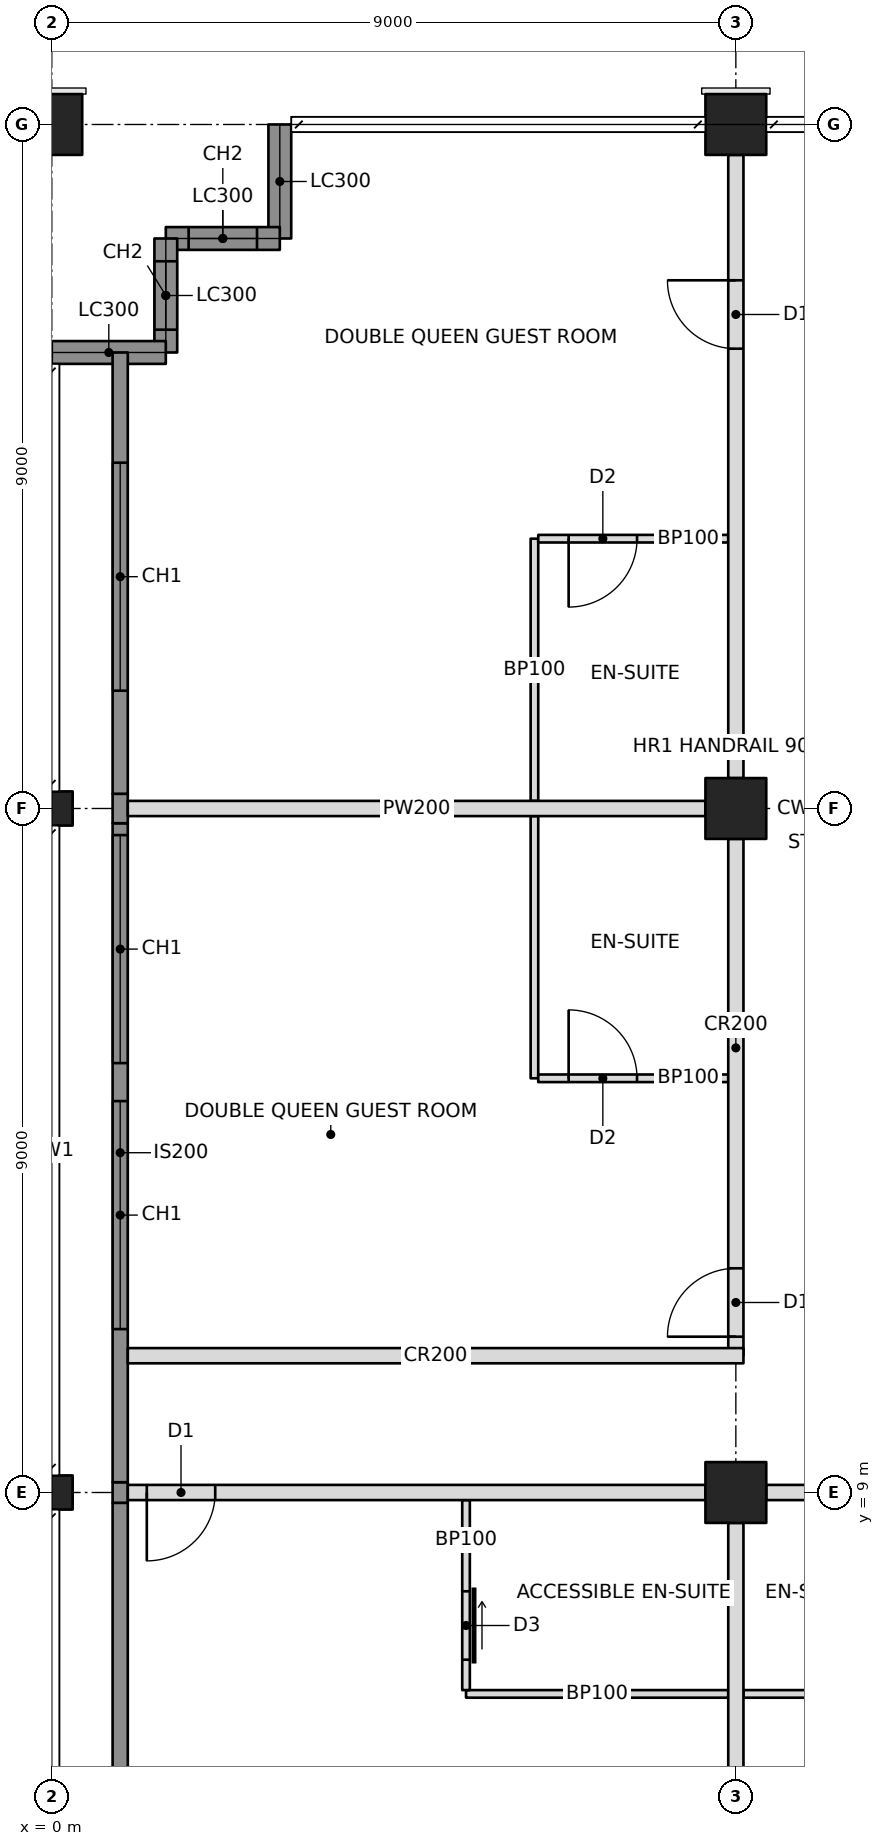
"""IFC4 building model, lengths in metres.
Left out: names, types, materials, properties, quantities, classifications, styles, units other than length and angle.
Written with IfcOpenShell. Run it as: python <this file> out.ifc"""

import sys

from ifc_helpers import new_model, si_unit, direction, frame, frame_2d, origin, origin_2d, place, context, subcontext, project, spatial, rectangle, hollow_rectangle, i_section, extrude, element, fill, save


model = new_model("IFC4")
c1 = context("Model", 3, precision=1e-05, world=origin(), true_north=direction((0.0, 1.0)))
c2 = subcontext(c1, "Body", "Model", "MODEL_VIEW")
j1 = project(units=[si_unit("LENGTHUNIT", "METRE"), si_unit("PLANEANGLEUNIT", "RADIAN")], contexts=[c1])
p1 = place(None, origin())
s1 = spatial("IfcSite", under=j1, at=p1, CompositionType="ELEMENT")
p2 = place(p1, origin())
s2 = spatial("IfcBuilding", under=s1, at=p2, CompositionType="ELEMENT")
p3 = place(p2, frame((0.0, 0.0, 191.0)))
s3 = spatial("IfcBuildingStorey", under=s2, at=p3, CompositionType="ELEMENT", Elevation=191.0)
for number, where, z_axis, x_axis in (
    (1, (0.0, 9.0, 0.0), (0.0, 0.0, 1.0), (0.0, 1.0, 0.0)),
    (2, (0.0, 18.0, 0.0), (0.0, 0.0, 1.0), (0.0, 1.0, 0.0)),
):
    element("IfcColumn", number, at=place(p3, frame(where, z_axis=z_axis, x_axis=x_axis)), inside=s3, PredefinedType="COLUMN", context=c2, shape_type="SweptSolid", body=[
        extrude(i_section(OverallWidth=0.449, OverallDepth=0.549, WebThickness=0.072, FlangeThickness=0.115, at=origin_2d()), origin(), (0.0, 0.0, 1.0), 3.4),
    ])
p4 = place(p3, frame((0.0, 27.0, 0.0), z_axis=(0.0, 0.0, 1.0), x_axis=(0.0, 1.0, 0.0)))
e3 = element("IfcColumn", 3, at=p4, inside=s3, PredefinedType="COLUMN", context=c2, shape_type="SweptSolid", body=[
    extrude(hollow_rectangle(XDim=0.8, YDim=0.8, WallThickness=0.07, at=origin_2d()), origin(), (0.0, 0.0, 1.0), 3.4),
])
for number, where, z_axis, x_axis in (
    (4, (9.0, 9.0, 0.0), (0.0, 0.0, 1.0), (1.0, 0.0, 0.0)),
    (5, (9.0, 18.0, 0.0), (0.0, 0.0, 1.0), (1.0, 0.0, 0.0)),
):
    element("IfcColumn", number, at=place(p3, frame(where, z_axis=z_axis, x_axis=x_axis)), inside=s3, PredefinedType="COLUMN", context=c2, shape_type="SweptSolid", body=[
        extrude(hollow_rectangle(XDim=0.8, YDim=0.8, WallThickness=0.06, at=origin_2d()), origin(), (0.0, 0.0, 1.0), 3.4),
    ])
p5 = place(p3, frame((9.0, 27.0, 0.0), z_axis=(0.0, 0.0, 1.0), x_axis=(1.0, 0.0, 0.0)))
e6 = element("IfcColumn", 6, at=p5, inside=s3, PredefinedType="COLUMN", context=c2, shape_type="SweptSolid", body=[
    extrude(hollow_rectangle(XDim=0.8, YDim=0.8, WallThickness=0.07, at=origin_2d()), origin(), (0.0, 0.0, 1.0), 3.4),
])
p6 = place(p3, frame((3.0, 27.0, 0.0), z_axis=(0.0, 0.0, 1.0), x_axis=(0.0, -1.0, 0.0)))
e7 = element("IfcWall", 7, at=p6, inside=s3, PredefinedType="SOLIDWALL", context=c2, shape_type="SweptSolid", body=[
    extrude(rectangle(XDim=1.5, YDim=0.3, at=frame_2d((0.75, 0.0))), origin(), (0.0, 0.0, 1.0), 2.42),
])
p7 = place(p3, frame((3.0, 25.5, 0.0), z_axis=(0.0, 0.0, 1.0), x_axis=(-1.0, 0.0, 0.0)))
e8 = element("IfcWall", 8, at=p7, inside=s3, PredefinedType="SOLIDWALL", context=c2, shape_type="SweptSolid", body=[
    extrude(rectangle(XDim=1.5, YDim=0.3, at=frame_2d((0.75, 0.0))), origin(), (0.0, 0.0, 1.0), 3.2),
])
p8 = place(p7, frame((0.3, 0.0, 0.6)))
e9 = element("IfcOpeningElement", 9, at=p8, cuts=e8, PredefinedType="OPENING", context=c2, shape_type="SweptSolid", body=[
    extrude(rectangle(XDim=0.9, YDim=2.2, at=frame_2d((0.45, 1.1))), frame((0.0, 0.16, 0.0), z_axis=(0.0, -1.0, 0.0), x_axis=(1.0, 0.0, 0.0)), (0.0, 0.0, 1.0), 0.32),
])
p9 = place(p3, frame((1.5, 25.5, 0.0), z_axis=(0.0, 0.0, 1.0), x_axis=(0.0, -1.0, 0.0)))
e10 = element("IfcWall", 10, at=p9, inside=s3, PredefinedType="SOLIDWALL", context=c2, shape_type="SweptSolid", body=[
    extrude(rectangle(XDim=1.5, YDim=0.3, at=frame_2d((0.75, 0.0))), origin(), (0.0, 0.0, 1.0), 3.2),
])
p10 = place(p9, frame((0.3, 0.0, 0.6)))
e11 = element("IfcOpeningElement", 11, at=p10, cuts=e10, PredefinedType="OPENING", context=c2, shape_type="SweptSolid", body=[
    extrude(rectangle(XDim=0.9, YDim=2.2, at=frame_2d((0.45, 1.1))), frame((0.0, 0.16, 0.0), z_axis=(0.0, -1.0, 0.0), x_axis=(1.0, 0.0, 0.0)), (0.0, 0.0, 1.0), 0.32),
])
p11 = place(p3, frame((1.5, 24.0, 0.0), z_axis=(0.0, 0.0, 1.0), x_axis=(-1.0, 0.0, 0.0)))
e12 = element("IfcWall", 12, at=p11, inside=s3, PredefinedType="SOLIDWALL", context=c2, shape_type="SweptSolid", body=[
    extrude(rectangle(XDim=1.5, YDim=0.3, at=frame_2d((0.75, 0.0))), origin(), (0.0, 0.0, 1.0), 2.42),
])
p12 = place(p3, frame((1.0, 9.0, 0.0), z_axis=(0.0, 0.0, 1.0), x_axis=(1.0, 0.0, 0.0)))
e13 = element("IfcWall", 13, at=p12, inside=s3, PredefinedType="PARTITIONING", context=c2, shape_type="SweptSolid", body=[
    extrude(rectangle(XDim=7.6, YDim=0.2, at=frame_2d((3.8, 0.0))), origin(), (0.0, 0.0, 1.0), 2.438),
])
p13 = place(p12, frame((0.25, 0.0, 0.0)))
e14 = element("IfcOpeningElement", 14, at=p13, cuts=e13, PredefinedType="OPENING", context=c2, shape_type="SweptSolid", body=[
    extrude(rectangle(XDim=0.9, YDim=2.1, at=frame_2d((0.45, 1.05))), frame((0.0, 0.11, 0.0), z_axis=(0.0, -1.0, 0.0), x_axis=(1.0, 0.0, 0.0)), (0.0, 0.0, 1.0), 0.22),
])
p14 = place(p3, frame((9.4, 9.0, 0.0), z_axis=(0.0, 0.0, 1.0), x_axis=(1.0, 0.0, 0.0)))
e15 = element("IfcWall", 15, at=p14, inside=s3, PredefinedType="PARTITIONING", context=c2, shape_type="SweptSolid", body=[
    extrude(rectangle(XDim=8.2, YDim=0.2, at=frame_2d((4.1, 0.0))), origin(), (0.0, 0.0, 1.0), 2.405),
])
p15 = place(p14, frame((2.95, 0.0, 0.0)))
e16 = element("IfcOpeningElement", 16, at=p15, cuts=e15, PredefinedType="OPENING", context=c2, shape_type="SweptSolid", body=[
    extrude(rectangle(XDim=0.9, YDim=2.1, at=frame_2d((0.45, 1.05))), frame((0.0, 0.11, 0.0), z_axis=(0.0, -1.0, 0.0), x_axis=(1.0, 0.0, 0.0)), (0.0, 0.0, 1.0), 0.22),
])
p16 = place(p14, frame((4.35, 0.0, 0.0)))
e17 = element("IfcOpeningElement", 17, at=p16, cuts=e15, PredefinedType="OPENING", context=c2, shape_type="SweptSolid", body=[
    extrude(rectangle(XDim=0.9, YDim=2.1, at=frame_2d((0.45, 1.05))), frame((0.0, 0.11, 0.0), z_axis=(0.0, -1.0, 0.0), x_axis=(1.0, 0.0, 0.0)), (0.0, 0.0, 1.0), 0.22),
])
p17 = place(p3, frame((9.0, 10.8, 0.0), z_axis=(0.0, 0.0, 1.0), x_axis=(0.0, 1.0, 0.0)))
e18 = element("IfcWall", 18, at=p17, inside=s3, PredefinedType="PARTITIONING", context=c2, shape_type="SweptSolid", body=[
    extrude(rectangle(XDim=6.8, YDim=0.2, at=frame_2d((3.4, 0.0))), origin(), (0.0, 0.0, 1.0), 2.405),
])
p18 = place(p17, frame((0.25, 0.0, 0.0)))
e19 = element("IfcOpeningElement", 19, at=p18, cuts=e18, PredefinedType="OPENING", context=c2, shape_type="SweptSolid", body=[
    extrude(rectangle(XDim=0.9, YDim=2.1, at=frame_2d((0.45, 1.05))), frame((0.0, 0.11, 0.0), z_axis=(0.0, -1.0, 0.0), x_axis=(1.0, 0.0, 0.0)), (0.0, 0.0, 1.0), 0.22),
])
p19 = place(p3, frame((9.0, 18.4, 0.0), z_axis=(0.0, 0.0, 1.0), x_axis=(0.0, 1.0, 0.0)))
e20 = element("IfcWall", 20, at=p19, inside=s3, PredefinedType="PARTITIONING", context=c2, shape_type="SweptSolid", body=[
    extrude(rectangle(XDim=8.2, YDim=0.2, at=frame_2d((4.1, 0.0))), origin(), (0.0, 0.0, 1.0), 2.405),
])
p20 = place(p19, frame((5.65, 0.0, 0.0)))
e21 = element("IfcOpeningElement", 21, at=p20, cuts=e20, PredefinedType="OPENING", context=c2, shape_type="SweptSolid", body=[
    extrude(rectangle(XDim=0.9, YDim=2.1, at=frame_2d((0.45, 1.05))), frame((0.0, 0.11, 0.0), z_axis=(0.0, -1.0, 0.0), x_axis=(1.0, 0.0, 0.0)), (0.0, 0.0, 1.0), 0.22),
])
p21 = place(p3, frame((1.0, 10.8, 0.0), z_axis=(0.0, 0.0, 1.0), x_axis=(1.0, 0.0, 0.0)))
e22 = element("IfcWall", 22, at=p21, inside=s3, PredefinedType="PARTITIONING", context=c2, shape_type="SweptSolid", body=[
    extrude(rectangle(XDim=8.1, YDim=0.2, at=frame_2d((4.05, 0.0))), origin(), (0.0, 0.0, 1.0), 2.404),
])
p22 = place(p3, frame((9.0, 8.6, 0.0), z_axis=(0.0, 0.0, 1.0), x_axis=(0.0, -1.0, 0.0)))
e23 = element("IfcWall", 23, at=p22, inside=s3, PredefinedType="PARTITIONING", context=c2, shape_type="SweptSolid", body=[
    extrude(rectangle(XDim=7.6, YDim=0.2, at=frame_2d((3.8, 0.0))), origin(), (0.0, 0.0, 1.0), 2.438),
])
p23 = place(p3, frame((5.45, 6.35, 0.0), z_axis=(0.0, 0.0, 1.0), x_axis=(1.0, 0.0, 0.0)))
e24 = element("IfcWall", 24, at=p23, inside=s3, PredefinedType="PARTITIONING", context=c2, shape_type="SweptSolid", body=[
    extrude(rectangle(XDim=3.45, YDim=0.1, at=frame_2d((1.725, 0.0))), origin(), (0.0, 0.0, 1.0), 2.438),
])
p24 = place(p3, frame((5.45, 8.9, 0.0), z_axis=(0.0, 0.0, 1.0), x_axis=(0.0, -1.0, 0.0)))
e25 = element("IfcWall", 25, at=p24, inside=s3, PredefinedType="PARTITIONING", context=c2, shape_type="SweptSolid", body=[
    extrude(rectangle(XDim=2.5, YDim=0.1, at=frame_2d((1.25, 0.0))), origin(), (0.0, 0.0, 1.0), 2.438),
])
p25 = place(p24, frame((1.2, 0.0, 0.0)))
e26 = element("IfcOpeningElement", 26, at=p25, cuts=e25, PredefinedType="OPENING", context=c2, shape_type="SweptSolid", body=[
    extrude(rectangle(XDim=0.9, YDim=2.1, at=frame_2d((0.45, 1.05))), frame((0.0, 0.06, 0.0), z_axis=(0.0, -1.0, 0.0), x_axis=(1.0, 0.0, 0.0)), (0.0, 0.0, 1.0), 0.12),
])
p26 = place(p3, frame((9.1, 6.35, 0.0), z_axis=(0.0, 0.0, 1.0), x_axis=(1.0, 0.0, 0.0)))
e27 = element("IfcWall", 27, at=p26, inside=s3, PredefinedType="PARTITIONING", context=c2, shape_type="SweptSolid", body=[
    extrude(rectangle(XDim=2.95, YDim=0.1, at=frame_2d((1.475, 0.0))), origin(), (0.0, 0.0, 1.0), 2.438),
])
p27 = place(p3, frame((8.6, 18.0, 0.0), z_axis=(0.0, 0.0, 1.0), x_axis=(-1.0, 0.0, 0.0)))
e28 = element("IfcWall", 28, at=p27, inside=s3, PredefinedType="PARTITIONING", context=c2, shape_type="SweptSolid", body=[
    extrude(rectangle(XDim=7.6, YDim=0.2, at=frame_2d((3.8, 0.0))), origin(), (0.0, 0.0, 1.0), 2.405),
])
p28 = place(p3, frame((6.35, 14.45, 0.0), z_axis=(0.0, 0.0, 1.0), x_axis=(0.0, 1.0, 0.0)))
e29 = element("IfcWall", 29, at=p28, inside=s3, PredefinedType="PARTITIONING", context=c2, shape_type="SweptSolid", body=[
    extrude(rectangle(XDim=3.45, YDim=0.1, at=frame_2d((1.725, 0.0))), origin(), (0.0, 0.0, 1.0), 2.404),
])
p29 = place(p3, frame((8.9, 14.45, 0.0), z_axis=(0.0, 0.0, 1.0), x_axis=(-1.0, 0.0, 0.0)))
e30 = element("IfcWall", 30, at=p29, inside=s3, PredefinedType="PARTITIONING", context=c2, shape_type="SweptSolid", body=[
    extrude(rectangle(XDim=2.5, YDim=0.1, at=frame_2d((1.25, 0.0))), origin(), (0.0, 0.0, 1.0), 2.404),
])
p30 = place(p29, frame((1.2, 0.0, 0.0)))
e31 = element("IfcOpeningElement", 31, at=p30, cuts=e30, PredefinedType="OPENING", context=c2, shape_type="SweptSolid", body=[
    extrude(rectangle(XDim=0.9, YDim=2.1, at=frame_2d((0.45, 1.05))), frame((0.0, 0.06, 0.0), z_axis=(0.0, -1.0, 0.0), x_axis=(1.0, 0.0, 0.0)), (0.0, 0.0, 1.0), 0.12),
])
p31 = place(p3, frame((6.35, 18.1, 0.0), z_axis=(0.0, 0.0, 1.0), x_axis=(0.0, 1.0, 0.0)))
e32 = element("IfcWall", 32, at=p31, inside=s3, PredefinedType="PARTITIONING", context=c2, shape_type="SweptSolid", body=[
    extrude(rectangle(XDim=3.45, YDim=0.1, at=frame_2d((1.725, 0.0))), origin(), (0.0, 0.0, 1.0), 2.404),
])
p32 = place(p3, frame((8.9, 21.55, 0.0), z_axis=(0.0, 0.0, 1.0), x_axis=(-1.0, 0.0, 0.0)))
e33 = element("IfcWall", 33, at=p32, inside=s3, PredefinedType="PARTITIONING", context=c2, shape_type="SweptSolid", body=[
    extrude(rectangle(XDim=2.5, YDim=0.1, at=frame_2d((1.25, 0.0))), origin(), (0.0, 0.0, 1.0), 2.404),
])
p33 = place(p32, frame((1.2, 0.0, 0.0)))
e34 = element("IfcOpeningElement", 34, at=p33, cuts=e33, PredefinedType="OPENING", context=c2, shape_type="SweptSolid", body=[
    extrude(rectangle(XDim=0.9, YDim=2.1, at=frame_2d((0.45, 1.05))), frame((0.0, 0.06, 0.0), z_axis=(0.0, -1.0, 0.0), x_axis=(1.0, 0.0, 0.0)), (0.0, 0.0, 1.0), 0.12),
])
p34 = place(p3, frame((0.9, 4.607, 0.0), z_axis=(0.0, 0.0, 1.0), x_axis=(0.0, 1.0, 0.0)))
e35 = element("IfcWall", 35, at=p34, inside=s3, PredefinedType="SOLIDWALL", context=c2, shape_type="SweptSolid", body=[
    extrude(rectangle(XDim=4.257, YDim=0.2, at=frame_2d((2.129, 0.0))), origin(), (0.0, 0.0, 1.0), 3.2),
])
p35 = place(p3, frame((0.9, 8.865, 0.0), z_axis=(0.0, 0.0, 1.0), x_axis=(0.0, 1.0, 0.0)))
e36 = element("IfcWall", 36, at=p35, inside=s3, PredefinedType="SOLIDWALL", context=c2, shape_type="SweptSolid", body=[
    extrude(rectangle(XDim=0.271, YDim=0.2, at=frame_2d((0.135, 0.0))), origin(), (0.0, 0.0, 1.0), 2.438),
])
p36 = place(p3, frame((0.9, 9.135, 0.0), z_axis=(0.0, 0.0, 1.0), x_axis=(0.0, 1.0, 0.0)))
e37 = element("IfcWall", 37, at=p36, inside=s3, PredefinedType="SOLIDWALL", context=c2, shape_type="SweptSolid", body=[
    extrude(rectangle(XDim=8.671, YDim=0.2, at=frame_2d((4.335, 0.0))), origin(), (0.0, 0.0, 1.0), 3.2),
])
p37 = place(p36, frame((2.015, 0.0, 0.6)))
e38 = element("IfcOpeningElement", 38, at=p37, cuts=e37, PredefinedType="OPENING", context=c2, shape_type="SweptSolid", body=[
    extrude(rectangle(XDim=3.0, YDim=2.2, at=frame_2d((1.5, 1.1))), frame((0.0, 0.11, 0.0), z_axis=(0.0, -1.0, 0.0), x_axis=(1.0, 0.0, 0.0)), (0.0, 0.0, 1.0), 0.22),
])
p38 = place(p36, frame((5.515, 0.0, 0.6)))
e39 = element("IfcOpeningElement", 39, at=p38, cuts=e37, PredefinedType="OPENING", context=c2, shape_type="SweptSolid", body=[
    extrude(rectangle(XDim=3.0, YDim=2.2, at=frame_2d((1.5, 1.1))), frame((0.0, 0.11, 0.0), z_axis=(0.0, -1.0, 0.0), x_axis=(1.0, 0.0, 0.0)), (0.0, 0.0, 1.0), 0.22),
])
p39 = place(p3, frame((0.9, 17.806, 0.0), z_axis=(0.0, 0.0, 1.0), x_axis=(0.0, 1.0, 0.0)))
e40 = element("IfcWall", 40, at=p39, inside=s3, PredefinedType="SOLIDWALL", context=c2, shape_type="SweptSolid", body=[
    extrude(rectangle(XDim=0.388, YDim=0.2, at=frame_2d((0.194, 0.0))), origin(), (0.0, 0.0, 1.0), 2.404),
])
p40 = place(p3, frame((0.9, 18.194, 0.0), z_axis=(0.0, 0.0, 1.0), x_axis=(0.0, 1.0, 0.0)))
e41 = element("IfcWall", 41, at=p40, inside=s3, PredefinedType="SOLIDWALL", context=c2, shape_type="SweptSolid", body=[
    extrude(rectangle(XDim=5.806, YDim=0.2, at=frame_2d((2.903, 0.0))), origin(), (0.0, 0.0, 1.0), 3.2),
])
p41 = place(p40, frame((1.356, 0.0, 0.6)))
e42 = element("IfcOpeningElement", 42, at=p41, cuts=e41, PredefinedType="OPENING", context=c2, shape_type="SweptSolid", body=[
    extrude(rectangle(XDim=3.0, YDim=2.2, at=frame_2d((1.5, 1.1))), frame((0.0, 0.11, 0.0), z_axis=(0.0, -1.0, 0.0), x_axis=(1.0, 0.0, 0.0)), (0.0, 0.0, 1.0), 0.22),
])
p42 = place(p8, origin())
e43 = element("IfcWindow", 43, at=p42, inside=s3, PartitioningType="SINGLE_PANEL", PredefinedType="WINDOW", context=c2, shape_type="SweptSolid", body=[
    extrude(rectangle(XDim=0.9, YDim=2.2, at=frame_2d((0.45, 1.1))), frame((0.0, 0.03, 0.0), z_axis=(0.0, -1.0, 0.0), x_axis=(1.0, 0.0, 0.0)), (0.0, 0.0, 1.0), 0.06),
])
fill(e9, e43)
p43 = place(p10, origin())
e44 = element("IfcWindow", 44, at=p43, inside=s3, PartitioningType="SINGLE_PANEL", PredefinedType="WINDOW", context=c2, shape_type="SweptSolid", body=[
    extrude(rectangle(XDim=0.9, YDim=2.2, at=frame_2d((0.45, 1.1))), frame((0.0, 0.03, 0.0), z_axis=(0.0, -1.0, 0.0), x_axis=(1.0, 0.0, 0.0)), (0.0, 0.0, 1.0), 0.06),
])
fill(e11, e44)
p44 = place(p37, origin())
e45 = element("IfcWindow", 45, at=p44, inside=s3, PartitioningType="TRIPLE_PANEL_VERTICAL", PredefinedType="WINDOW", context=c2, shape_type="SweptSolid", body=[
    extrude(rectangle(XDim=3.0, YDim=2.2, at=frame_2d((1.5, 1.1))), frame((0.0, 0.03, 0.0), z_axis=(0.0, -1.0, 0.0), x_axis=(1.0, 0.0, 0.0)), (0.0, 0.0, 1.0), 0.06),
])
fill(e38, e45)
p45 = place(p38, origin())
e46 = element("IfcWindow", 46, at=p45, inside=s3, PartitioningType="TRIPLE_PANEL_VERTICAL", PredefinedType="WINDOW", context=c2, shape_type="SweptSolid", body=[
    extrude(rectangle(XDim=3.0, YDim=2.2, at=frame_2d((1.5, 1.1))), frame((0.0, 0.03, 0.0), z_axis=(0.0, -1.0, 0.0), x_axis=(1.0, 0.0, 0.0)), (0.0, 0.0, 1.0), 0.06),
])
fill(e39, e46)
p46 = place(p41, origin())
e47 = element("IfcWindow", 47, at=p46, inside=s3, PartitioningType="TRIPLE_PANEL_VERTICAL", PredefinedType="WINDOW", context=c2, shape_type="SweptSolid", body=[
    extrude(rectangle(XDim=3.0, YDim=2.2, at=frame_2d((1.5, 1.1))), frame((0.0, 0.03, 0.0), z_axis=(0.0, -1.0, 0.0), x_axis=(1.0, 0.0, 0.0)), (0.0, 0.0, 1.0), 0.06),
])
fill(e42, e47)
p47 = place(p25, origin())
e48 = element("IfcDoor", 48, at=p47, inside=s3, OperationType="SLIDING_TO_LEFT", PredefinedType="DOOR", context=c2, shape_type="SweptSolid", body=[
    extrude(rectangle(XDim=0.9, YDim=2.1, at=frame_2d((0.45, 1.05))), frame((0.0, 0.025, 0.0), z_axis=(0.0, -1.0, 0.0), x_axis=(1.0, 0.0, 0.0)), (0.0, 0.0, 1.0), 0.05),
])
fill(e26, e48)
p48 = place(p13, frame((0.9, 0.0, 0.0), z_axis=(0.0, 0.0, 1.0), x_axis=(-1.0, 0.0, 0.0)))
e49 = element("IfcDoor", 49, at=p48, inside=s3, OperationType="SINGLE_SWING_RIGHT", PredefinedType="DOOR", context=c2, shape_type="SweptSolid", body=[
    extrude(rectangle(XDim=0.9, YDim=2.1, at=frame_2d((0.45, 1.05))), frame((0.0, 0.025, 0.0), z_axis=(0.0, -1.0, 0.0), x_axis=(1.0, 0.0, 0.0)), (0.0, 0.0, 1.0), 0.05),
])
fill(e14, e49)
p49 = place(p30, frame((0.9, 0.0, 0.0), z_axis=(0.0, 0.0, 1.0), x_axis=(-1.0, 0.0, 0.0)))
e50 = element("IfcDoor", 50, at=p49, inside=s3, OperationType="SINGLE_SWING_LEFT", PredefinedType="DOOR", context=c2, shape_type="SweptSolid", body=[
    extrude(rectangle(XDim=0.9, YDim=2.1, at=frame_2d((0.45, 1.05))), frame((0.0, 0.025, 0.0), z_axis=(0.0, -1.0, 0.0), x_axis=(1.0, 0.0, 0.0)), (0.0, 0.0, 1.0), 0.05),
])
fill(e31, e50)
p50 = place(p18, origin())
e51 = element("IfcDoor", 51, at=p50, inside=s3, OperationType="SINGLE_SWING_LEFT", PredefinedType="DOOR", context=c2, shape_type="SweptSolid", body=[
    extrude(rectangle(XDim=0.9, YDim=2.1, at=frame_2d((0.45, 1.05))), frame((0.0, 0.025, 0.0), z_axis=(0.0, -1.0, 0.0), x_axis=(1.0, 0.0, 0.0)), (0.0, 0.0, 1.0), 0.05),
])
fill(e19, e51)
p51 = place(p33, origin())
e52 = element("IfcDoor", 52, at=p51, inside=s3, OperationType="SINGLE_SWING_RIGHT", PredefinedType="DOOR", context=c2, shape_type="SweptSolid", body=[
    extrude(rectangle(XDim=0.9, YDim=2.1, at=frame_2d((0.45, 1.05))), frame((0.0, 0.025, 0.0), z_axis=(0.0, -1.0, 0.0), x_axis=(1.0, 0.0, 0.0)), (0.0, 0.0, 1.0), 0.05),
])
fill(e34, e52)
p52 = place(p20, origin())
e53 = element("IfcDoor", 53, at=p52, inside=s3, OperationType="SINGLE_SWING_RIGHT", PredefinedType="DOOR", context=c2, shape_type="SweptSolid", body=[
    extrude(rectangle(XDim=0.9, YDim=2.1, at=frame_2d((0.45, 1.05))), frame((0.0, 0.025, 0.0), z_axis=(0.0, -1.0, 0.0), x_axis=(1.0, 0.0, 0.0)), (0.0, 0.0, 1.0), 0.05),
])
fill(e21, e53)
save(model, sys.argv[1])
